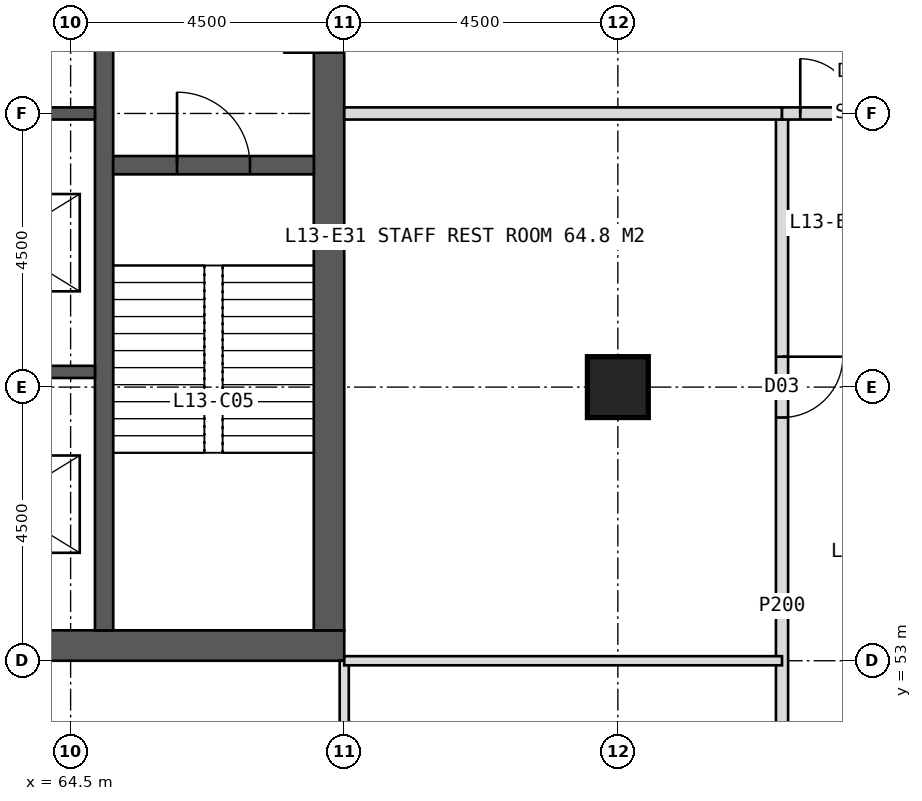
"""IFC4 building model, lengths in metres.
Left out: names, types, materials, properties, quantities, classifications, styles, units other than length and angle.
Written with IfcOpenShell. Run it as: python <this file> out.ifc"""

import sys

from ifc_helpers import new_model, si_unit, direction, frame, frame_2d, origin, origin_2d, place, context, subcontext, project, spatial, rectangle, hollow_rectangle, extrude, element, fill, save


model = new_model("IFC4")
c1 = context("Model", 3, precision=1e-05, world=origin(), true_north=direction((0.0, 1.0)))
c2 = subcontext(c1, "Body", "Model", "MODEL_VIEW")
j1 = project(units=[si_unit("LENGTHUNIT", "METRE"), si_unit("PLANEANGLEUNIT", "RADIAN")], contexts=[c1])
p1 = place(None, origin())
s1 = spatial("IfcSite", under=j1, at=p1, CompositionType="ELEMENT")
p2 = place(p1, origin())
s2 = spatial("IfcBuilding", under=s1, at=p2, CompositionType="ELEMENT")
p3 = place(p2, frame((0.0, 0.0, 59.0)))
s3 = spatial("IfcBuildingStorey", under=s2, at=p3, CompositionType="ELEMENT", Elevation=59.0)
p4 = place(p3, frame((51.0, 53.25, 0.0), z_axis=(0.0, 0.0, 1.0), x_axis=(1.0, 0.0, 0.0)))
e1 = element("IfcWall", 1, at=p4, inside=s3, PredefinedType="SHEAR", context=c2, shape_type="SweptSolid", body=[
    extrude(rectangle(XDim=18.0, YDim=0.5, at=frame_2d((9.0, 0.0))), origin(), (0.0, 0.0, 1.0), 4.0),
])
p5 = place(p4, frame((8.1, 0.0, 0.0)))
e2 = element("IfcOpeningElement", 2, at=p5, cuts=e1, PredefinedType="OPENING", context=c2, shape_type="SweptSolid", body=[
    extrude(rectangle(XDim=1.8, YDim=2.2, at=frame_2d((0.9, 1.1))), frame((0.0, 0.26, 0.0), z_axis=(0.0, -1.0, 0.0), x_axis=(1.0, 0.0, 0.0)), (0.0, 0.0, 1.0), 0.52),
])
p6 = place(p3, frame((68.75, 53.5, 0.0), z_axis=(0.0, 0.0, 1.0), x_axis=(0.0, 1.0, 0.0)))
e3 = element("IfcWall", 3, at=p6, inside=s3, PredefinedType="SHEAR", context=c2, shape_type="SweptSolid", body=[
    extrude(rectangle(XDim=17.0, YDim=0.5, at=frame_2d((8.5, 0.0))), origin(), (0.0, 0.0, 1.0), 4.0),
])
p7 = place(p6, frame((9.5, 0.0, 0.0)))
e4 = element("IfcOpeningElement", 4, at=p7, cuts=e3, PredefinedType="OPENING", context=c2, shape_type="SweptSolid", body=[
    extrude(rectangle(XDim=1.5, YDim=2.2, at=frame_2d((0.75, 1.1))), frame((0.0, 0.26, 0.0), z_axis=(0.0, -1.0, 0.0), x_axis=(1.0, 0.0, 0.0)), (0.0, 0.0, 1.0), 0.52),
])
p8 = place(p3, frame((65.05, 53.5, 0.0), z_axis=(0.0, 0.0, 1.0), x_axis=(0.0, 1.0, 0.0)))
e5 = element("IfcWall", 5, at=p8, inside=s3, PredefinedType="SHEAR", context=c2, shape_type="SweptSolid", body=[
    extrude(rectangle(XDim=17.0, YDim=0.3, at=frame_2d((8.5, 0.0))), origin(), (0.0, 0.0, 1.0), 4.0),
])
for number, where, z_axis, x_axis in (
    (6, (61.85, 57.75, 0.0), (0.0, 0.0, 1.0), (1.0, 0.0, 0.0)),
    (7, (61.85, 62.0, 0.0), (0.0, 0.0, 1.0), (1.0, 0.0, 0.0)),
):
    element("IfcWall", number, at=place(p3, frame(where, z_axis=z_axis, x_axis=x_axis)), inside=s3, PredefinedType="SHEAR", context=c2, shape_type="SweptSolid", body=[
        extrude(rectangle(XDim=3.05, YDim=0.2, at=frame_2d((1.525, 0.0))), origin(), (0.0, 0.0, 1.0), 4.0),
    ])
p9 = place(p3, frame((65.2, 61.15, 0.0), z_axis=(0.0, 0.0, 1.0), x_axis=(1.0, 0.0, 0.0)))
e8 = element("IfcWall", 8, at=p9, inside=s3, PredefinedType="SHEAR", context=c2, shape_type="SweptSolid", body=[
    extrude(rectangle(XDim=3.3, YDim=0.3, at=frame_2d((1.65, 0.0))), origin(), (0.0, 0.0, 1.0), 4.0),
])
p10 = place(p9, frame((1.05, 0.0, 0.0)))
e9 = element("IfcOpeningElement", 9, at=p10, cuts=e8, PredefinedType="OPENING", context=c2, shape_type="SweptSolid", body=[
    extrude(rectangle(XDim=1.2, YDim=2.1, at=frame_2d((0.6, 1.05))), frame((0.0, 0.16, 0.0), z_axis=(0.0, -1.0, 0.0), x_axis=(1.0, 0.0, 0.0)), (0.0, 0.0, 1.0), 0.32),
])
p11 = place(p3, frame((73.5, 57.5, 0.0), z_axis=(0.0, 0.0, 1.0), x_axis=(1.0, 0.0, 0.0)))
e10 = element("IfcColumn", 10, at=p11, inside=s3, PredefinedType="COLUMN", context=c2, shape_type="SweptSolid", body=[
    extrude(hollow_rectangle(XDim=1.0, YDim=1.0, WallThickness=0.1, at=origin_2d()), origin(), (0.0, 0.0, 1.0), 4.0),
])
p12 = place(p3, frame((69.0, 53.0, 0.0), z_axis=(0.0, 0.0, 1.0), x_axis=(0.0, -1.0, 0.0)))
e11 = element("IfcWall", 11, at=p12, inside=s3, PredefinedType="PARTITIONING", context=c2, shape_type="SweptSolid", body=[
    extrude(rectangle(XDim=7.2, YDim=0.15, at=frame_2d((3.6, 0.0))), origin(), (0.0, 0.0, 1.0), 3.75),
])
p13 = place(p3, frame((76.2, 62.0, 0.0), z_axis=(0.0, 0.0, 1.0), x_axis=(0.0, -1.0, 0.0)))
e12 = element("IfcWall", 12, at=p13, inside=s3, PredefinedType="PARTITIONING", context=c2, shape_type="SweptSolid", body=[
    extrude(rectangle(XDim=16.2, YDim=0.2, at=frame_2d((8.1, 0.0))), origin(), (0.0, 0.0, 1.0), 3.75),
])
p14 = place(p13, frame((4.0, 0.0, 0.0)))
e13 = element("IfcOpeningElement", 13, at=p14, cuts=e12, PredefinedType="OPENING", context=c2, shape_type="SweptSolid", body=[
    extrude(rectangle(XDim=1.0, YDim=2.1, at=frame_2d((0.5, 1.05))), frame((0.0, 0.11, 0.0), z_axis=(0.0, -1.0, 0.0), x_axis=(1.0, 0.0, 0.0)), (0.0, 0.0, 1.0), 0.22),
])
p15 = place(p13, frame((12.1, 0.0, 0.0)))
e14 = element("IfcOpeningElement", 14, at=p15, cuts=e12, PredefinedType="OPENING", context=c2, shape_type="SweptSolid", body=[
    extrude(rectangle(XDim=1.0, YDim=2.1, at=frame_2d((0.5, 1.05))), frame((0.0, 0.11, 0.0), z_axis=(0.0, -1.0, 0.0), x_axis=(1.0, 0.0, 0.0)), (0.0, 0.0, 1.0), 0.22),
])
p16 = place(p3, frame((69.0, 62.0, 0.0), z_axis=(0.0, 0.0, 1.0), x_axis=(1.0, 0.0, 0.0)))
e15 = element("IfcWall", 15, at=p16, inside=s3, PredefinedType="SOLIDWALL", context=c2, shape_type="SweptSolid", body=[
    extrude(rectangle(XDim=7.2, YDim=0.2, at=frame_2d((3.6, 0.0))), origin(), (0.0, 0.0, 1.0), 2.75),
])
p17 = place(p3, frame((69.0, 53.0, 0.0), z_axis=(0.0, 0.0, 1.0), x_axis=(1.0, 0.0, 0.0)))
e16 = element("IfcWall", 16, at=p17, inside=s3, PredefinedType="PARTITIONING", context=c2, shape_type="SweptSolid", body=[
    extrude(rectangle(XDim=7.2, YDim=0.15, at=frame_2d((3.6, 0.0))), origin(), (0.0, 0.0, 1.0), 3.75),
])
p18 = place(p3, frame((76.2, 62.0, 0.0), z_axis=(0.0, 0.0, 1.0), x_axis=(1.0, 0.0, 0.0)))
e17 = element("IfcWall", 17, at=p18, inside=s3, PredefinedType="SOLIDWALL", context=c2, shape_type="SweptSolid", body=[
    extrude(rectangle(XDim=2.7, YDim=0.2, at=frame_2d((1.35, 0.0))), origin(), (0.0, 0.0, 1.0), 2.75),
])
p19 = place(p18, frame((0.3, 0.0, 0.0)))
e18 = element("IfcOpeningElement", 18, at=p19, cuts=e17, PredefinedType="OPENING", context=c2, shape_type="SweptSolid", body=[
    extrude(rectangle(XDim=1.8, YDim=2.2, at=frame_2d((0.9, 1.1))), frame((0.0, 0.11, 0.0), z_axis=(0.0, -1.0, 0.0), x_axis=(1.0, 0.0, 0.0)), (0.0, 0.0, 1.0), 0.22),
])
p20 = place(p14, origin())
e19 = element("IfcDoor", 19, at=p20, inside=s3, OperationType="SINGLE_SWING_LEFT", PredefinedType="DOOR", context=c2, shape_type="SweptSolid", body=[
    extrude(rectangle(XDim=1.0, YDim=2.1, at=frame_2d((0.5, 1.05))), frame((0.0, 0.025, 0.0), z_axis=(0.0, -1.0, 0.0), x_axis=(1.0, 0.0, 0.0)), (0.0, 0.0, 1.0), 0.05),
])
fill(e13, e19)
p21 = place(p19, origin())
e20 = element("IfcDoor", 20, at=p21, inside=s3, OperationType="DOUBLE_DOOR_DOUBLE_SWING", PredefinedType="DOOR", context=c2, shape_type="SweptSolid", body=[
    extrude(rectangle(XDim=1.8, YDim=2.2, at=frame_2d((0.9, 1.1))), frame((0.0, 0.025, 0.0), z_axis=(0.0, -1.0, 0.0), x_axis=(1.0, 0.0, 0.0)), (0.0, 0.0, 1.0), 0.05),
])
fill(e18, e20)
p22 = place(p10, origin())
e21 = element("IfcDoor", 21, at=p22, inside=s3, OperationType="SINGLE_SWING_LEFT", PredefinedType="DOOR", context=c2, shape_type="SweptSolid", body=[
    extrude(rectangle(XDim=1.2, YDim=2.1, at=frame_2d((0.6, 1.05))), frame((0.0, 0.025, 0.0), z_axis=(0.0, -1.0, 0.0), x_axis=(1.0, 0.0, 0.0)), (0.0, 0.0, 1.0), 0.05),
])
fill(e9, e21)
save(model, sys.argv[1])
